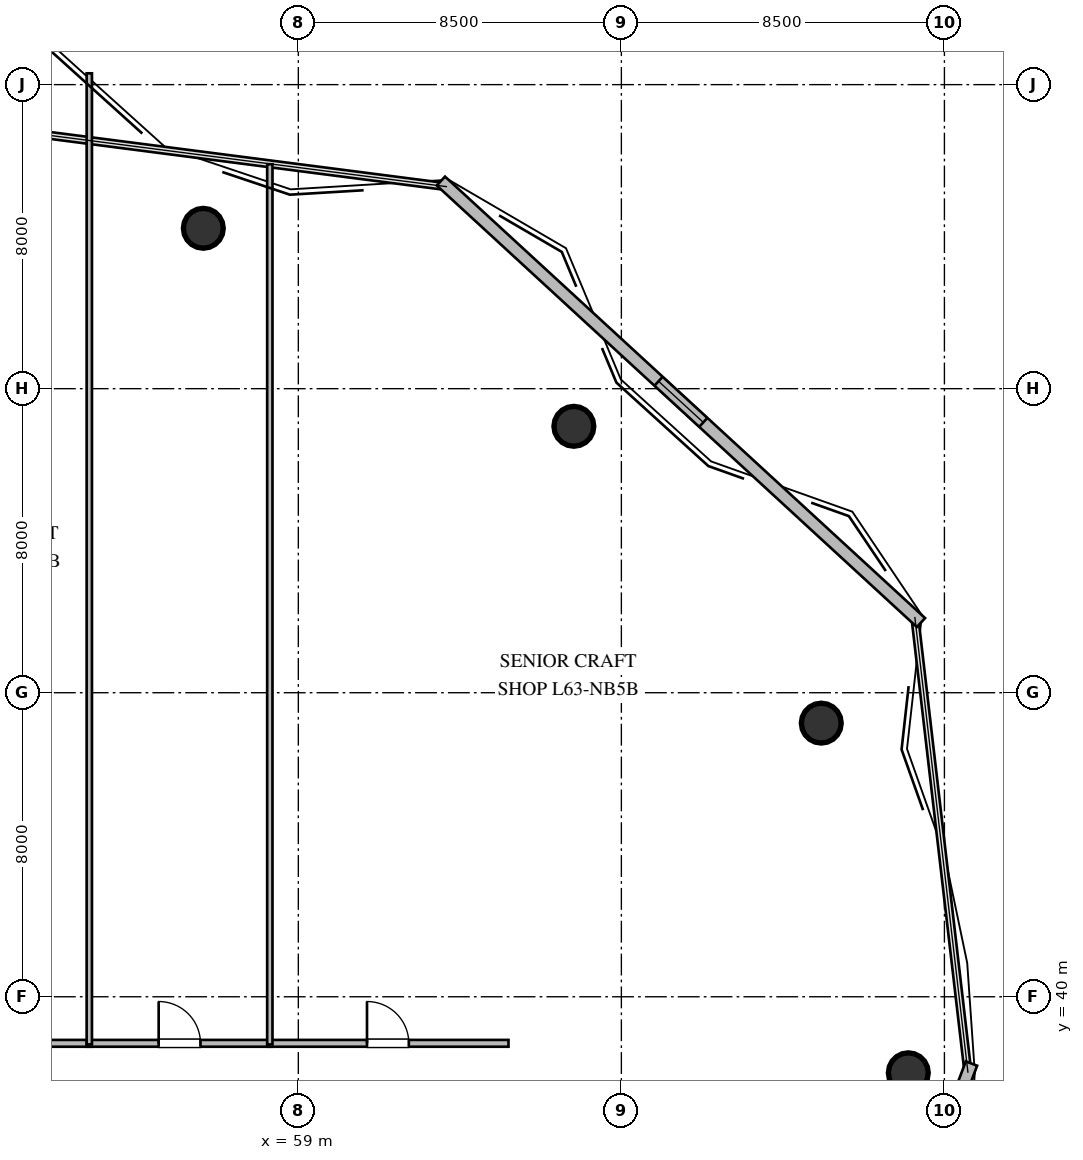
"""IFC4 building model, lengths in metres.
Left out: names, types, materials, properties, quantities, classifications, styles, units other than length and angle.
Written with IfcOpenShell. Run it as: python <this file> out.ifc"""

import sys

from ifc_helpers import new_model, si_unit, direction, frame, frame_2d, origin, origin_2d, place, context, subcontext, project, spatial, rectangle, circle, extrude, element, fill, save


model = new_model("IFC4")
c1 = context("Model", 3, precision=1e-05, world=origin(), true_north=direction((0.0, 1.0)))
c2 = subcontext(c1, "Body", "Model", "MODEL_VIEW")
j1 = project(units=[si_unit("LENGTHUNIT", "METRE"), si_unit("PLANEANGLEUNIT", "RADIAN")], contexts=[c1])
p1 = place(None, origin())
s1 = spatial("IfcSite", under=j1, at=p1, CompositionType="ELEMENT")
p2 = place(p1, origin())
s2 = spatial("IfcBuilding", under=s1, at=p2, CompositionType="ELEMENT")
p3 = place(p2, frame((0.0, 0.0, 238.8)))
s3 = spatial("IfcBuildingStorey", under=s2, at=p3, CompositionType="ELEMENT", Elevation=238.8)
for number, where, z_axis, x_axis in (
    (1, (75.05, 38.0, 0.0), (0.0, 0.0, 1.0), (1.0, 0.0, 0.0)),
    (2, (72.76, 47.2, 0.0), (0.0, 0.0, 1.0), (1.0, 0.0, 0.0)),
    (3, (66.25, 55.01, 0.0), (0.0, 0.0, 1.0), (1.0, 0.0, 0.0)),
    (4, (56.5, 60.22, 0.0), (0.0, 0.0, 1.0), (1.0, 0.0, 0.0)),
):
    element("IfcColumn", number, at=place(p3, frame(where, z_axis=z_axis, x_axis=x_axis)), inside=s3, PredefinedType="COLUMN", context=c2, shape_type="SweptSolid", body=[
        extrude(circle(Radius=0.525, at=origin_2d()), origin(), (0.0, 0.0, 1.0), 3.6),
    ])
p4 = place(p3, frame((76.712, 38.243, 0.0), z_axis=(0.0, 0.0, 1.0), x_axis=(-0.353659523244, -0.935374225441, 0.0)))
e5 = element("IfcWall", 5, at=p4, inside=s3, PredefinedType="STANDARD", context=c2, shape_type="SweptSolid", body=[
    extrude(rectangle(XDim=14.172, YDim=0.32, at=frame_2d((7.086, 0.0))), origin(), (0.0, 0.0, 1.0), 3.36),
])
p5 = place(p3, frame((62.751, 61.463, 0.0), z_axis=(0.0, 0.0, 1.0), x_axis=(0.736063690764, -0.676912286149, 0.0)))
e6 = element("IfcWall", 6, at=p5, inside=s3, PredefinedType="STANDARD", context=c2, shape_type="SweptSolid", body=[
    extrude(rectangle(XDim=17.162, YDim=0.32, at=frame_2d((8.581, 0.0))), origin(), (0.0, 0.0, 1.0), 3.36),
])
p6 = place(p5, frame((7.781, 0.0, 1.05)))
e7 = element("IfcOpeningElement", 7, at=p6, cuts=e6, PredefinedType="OPENING", context=c2, shape_type="SweptSolid", body=[
    extrude(rectangle(XDim=1.6, YDim=1.5, at=frame_2d((0.8, 0.75))), frame((0.0, 0.17, 0.0), z_axis=(0.0, -1.0, 0.0), x_axis=(1.0, 0.0, 0.0)), (0.0, 0.0, 1.0), 0.34),
])
p7 = place(p3, frame((48.185, 38.775, 0.0), z_axis=(0.0, 0.0, 1.0), x_axis=(1.0, 0.0, 0.0)))
e8 = element("IfcWall", 8, at=p7, inside=s3, PredefinedType="PARTITIONING", context=c2, shape_type="SweptSolid", body=[
    extrude(rectangle(XDim=5.38, YDim=0.18, at=frame_2d((2.69, 0.0))), origin(), (0.0, 0.0, 1.0), 3.36),
])
p8 = place(p7, frame((2.14, 0.0, 0.0)))
e9 = element("IfcOpeningElement", 9, at=p8, cuts=e8, PredefinedType="OPENING", context=c2, shape_type="SweptSolid", body=[
    extrude(rectangle(XDim=1.1, YDim=2.1, at=frame_2d((0.55, 1.05))), frame((0.0, 0.1, 0.0), z_axis=(0.0, -1.0, 0.0), x_axis=(1.0, 0.0, 0.0)), (0.0, 0.0, 1.0), 0.2),
])
p9 = place(p3, frame((53.435, 38.775, 0.0), z_axis=(0.0, 0.0, 1.0), x_axis=(1.0, 0.0, 0.0)))
e10 = element("IfcWall", 10, at=p9, inside=s3, PredefinedType="PARTITIONING", context=c2, shape_type="SweptSolid", body=[
    extrude(rectangle(XDim=4.88, YDim=0.18, at=frame_2d((2.44, 0.0))), origin(), (0.0, 0.0, 1.0), 3.36),
])
p10 = place(p9, frame((1.89, 0.0, 0.0)))
e11 = element("IfcOpeningElement", 11, at=p10, cuts=e10, PredefinedType="OPENING", context=c2, shape_type="SweptSolid", body=[
    extrude(rectangle(XDim=1.1, YDim=2.1, at=frame_2d((0.55, 1.05))), frame((0.0, 0.1, 0.0), z_axis=(0.0, -1.0, 0.0), x_axis=(1.0, 0.0, 0.0)), (0.0, 0.0, 1.0), 0.2),
])
p11 = place(p3, frame((58.185, 38.775, 0.0), z_axis=(0.0, 0.0, 1.0), x_axis=(1.0, 0.0, 0.0)))
e12 = element("IfcWall", 12, at=p11, inside=s3, PredefinedType="PARTITIONING", context=c2, shape_type="SweptSolid", body=[
    extrude(rectangle(XDim=6.345, YDim=0.18, at=frame_2d((3.172, 0.0))), origin(), (0.0, 0.0, 1.0), 3.36),
])
p12 = place(p11, frame((2.622, 0.0, 0.0)))
e13 = element("IfcOpeningElement", 13, at=p12, cuts=e12, PredefinedType="OPENING", context=c2, shape_type="SweptSolid", body=[
    extrude(rectangle(XDim=1.1, YDim=2.1, at=frame_2d((0.55, 1.05))), frame((0.0, 0.1, 0.0), z_axis=(0.0, -1.0, 0.0), x_axis=(1.0, 0.0, 0.0)), (0.0, 0.0, 1.0), 0.2),
])
p13 = place(p3, frame((53.5, 64.298, 0.0), z_axis=(0.0, 0.0, 1.0), x_axis=(0.0, -1.0, 0.0)))
e14 = element("IfcWall", 14, at=p13, inside=s3, PredefinedType="PARTITIONING", context=c2, shape_type="SweptSolid", body=[
    extrude(rectangle(XDim=25.553, YDim=0.14, at=frame_2d((12.776, 0.0))), origin(), (0.0, 0.0, 1.0), 3.36),
])
p14 = place(p3, frame((58.25, 61.906, 0.0), z_axis=(0.0, 0.0, 1.0), x_axis=(0.0, -1.0, 0.0)))
e15 = element("IfcWall", 15, at=p14, inside=s3, PredefinedType="PARTITIONING", context=c2, shape_type="SweptSolid", body=[
    extrude(rectangle(XDim=23.161, YDim=0.14, at=frame_2d((11.581, 0.0))), origin(), (0.0, 0.0, 1.0), 3.36),
])
p15 = place(p6, origin())
e16 = element("IfcWindow", 16, at=p15, inside=s3, PartitioningType="SINGLE_PANEL", PredefinedType="WINDOW", context=c2, shape_type="SweptSolid", body=[
    extrude(rectangle(XDim=1.6, YDim=1.5, at=frame_2d((0.8, 0.75))), frame((0.0, 0.03, 0.0), z_axis=(0.0, -1.0, 0.0), x_axis=(1.0, 0.0, 0.0)), (0.0, 0.0, 1.0), 0.06),
])
fill(e7, e16)
p16 = place(p10, origin())
e17 = element("IfcDoor", 17, at=p16, inside=s3, OperationType="SINGLE_SWING_LEFT", PredefinedType="DOOR", context=c2, shape_type="SweptSolid", body=[
    extrude(rectangle(XDim=1.1, YDim=2.1, at=frame_2d((0.55, 1.05))), frame((0.0, 0.025, 0.0), z_axis=(0.0, -1.0, 0.0), x_axis=(1.0, 0.0, 0.0)), (0.0, 0.0, 1.0), 0.05),
])
fill(e11, e17)
p17 = place(p12, origin())
e18 = element("IfcDoor", 18, at=p17, inside=s3, OperationType="SINGLE_SWING_LEFT", PredefinedType="DOOR", context=c2, shape_type="SweptSolid", body=[
    extrude(rectangle(XDim=1.1, YDim=2.1, at=frame_2d((0.55, 1.05))), frame((0.0, 0.025, 0.0), z_axis=(0.0, -1.0, 0.0), x_axis=(1.0, 0.0, 0.0)), (0.0, 0.0, 1.0), 0.05),
])
fill(e13, e18)
save(model, sys.argv[1])
